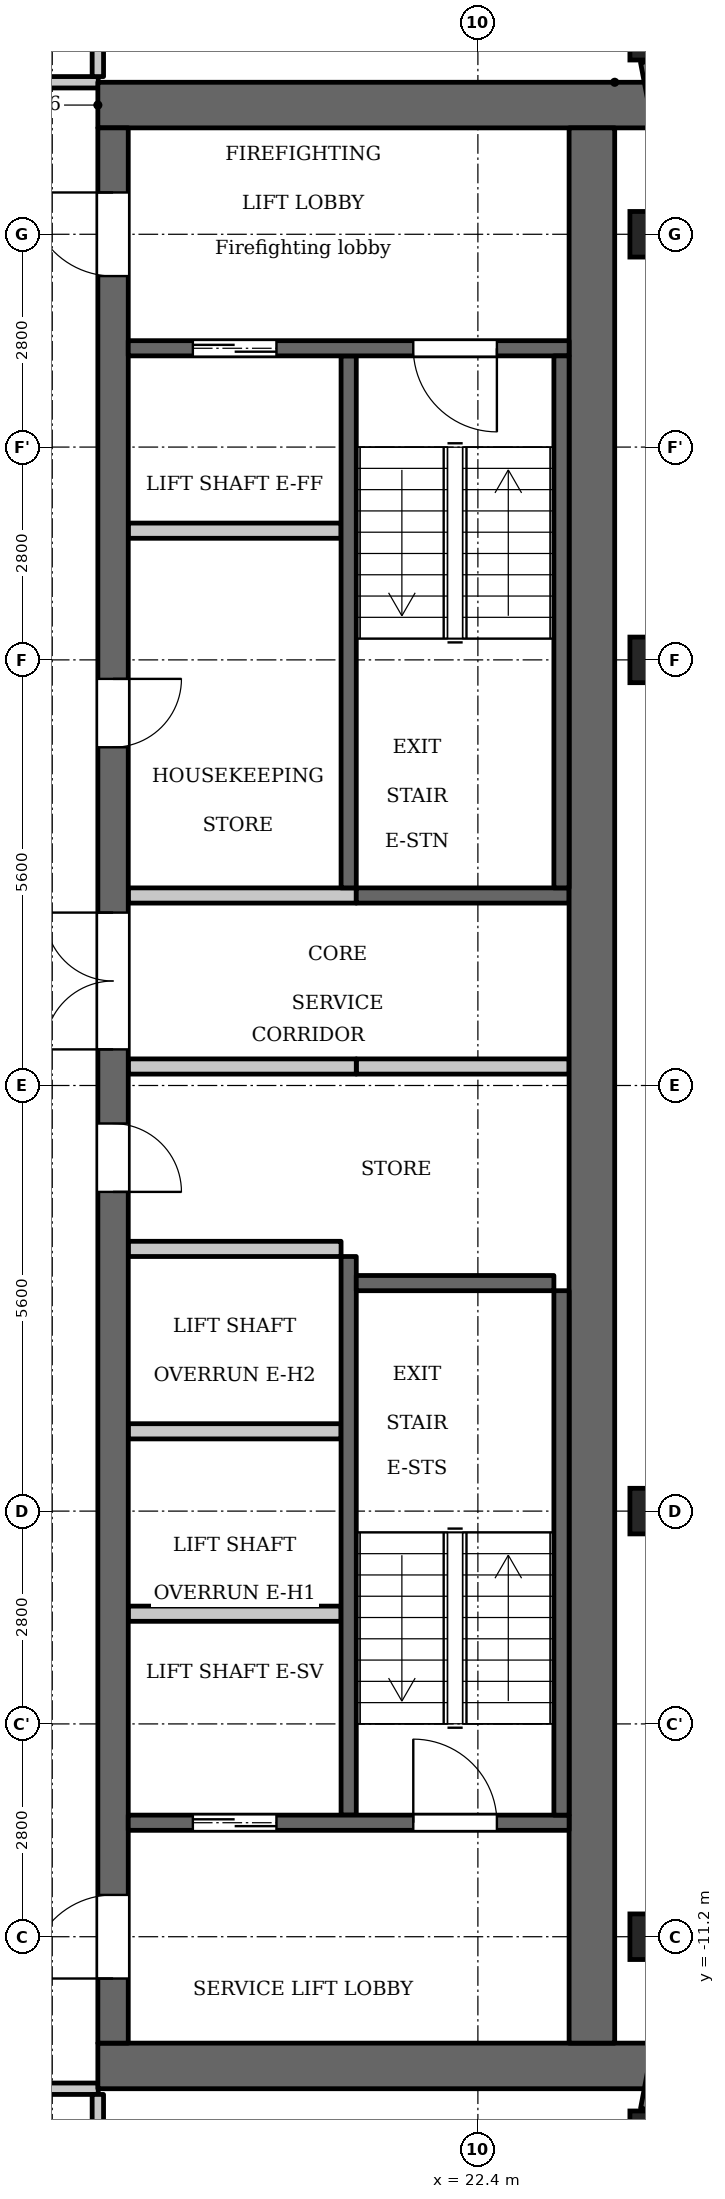
"""IFC4 building model, lengths in metres.
Left out: names, types, materials, properties, quantities, classifications, styles, units other than length and angle.
Written with IfcOpenShell. Run it as: python <this file> out.ifc"""

import sys

from ifc_helpers import new_model, si_unit, direction, frame, frame_2d, origin, origin_2d, place, context, subcontext, project, spatial, rectangle, extrude, element, fill, save


model = new_model("IFC4")
c1 = context("Model", 3, precision=1e-05, world=origin(), true_north=direction((0.0, 1.0)))
c2 = subcontext(c1, "Body", "Model", "MODEL_VIEW")
j1 = project(units=[si_unit("LENGTHUNIT", "METRE"), si_unit("PLANEANGLEUNIT", "RADIAN")], contexts=[c1])
p1 = place(None, origin())
s1 = spatial("IfcSite", under=j1, at=p1, CompositionType="ELEMENT")
p2 = place(p1, origin())
s2 = spatial("IfcBuilding", under=s1, at=p2, CompositionType="ELEMENT")
p3 = place(p2, frame((0.0, 0.0, 299.9)))
s3 = spatial("IfcBuildingStorey", under=s2, at=p3, CompositionType="ELEMENT", Elevation=299.9)
for number, where, z_axis, x_axis in (
    (1, (24.7, -13.793, 0.0), (0.0, 0.0, 1.0), (1.0, 0.0, 0.0)),
    (2, (24.7, -11.2, 0.0), (0.0, 0.0, 1.0), (1.0, 0.0, 0.0)),
    (3, (24.7, -5.6, 0.0), (0.0, 0.0, 1.0), (1.0, 0.0, 0.0)),
    (4, (24.7, 5.6, 0.0), (0.0, 0.0, 1.0), (1.0, 0.0, 0.0)),
    (5, (24.7, 11.2, 0.0), (0.0, 0.0, 1.0), (1.0, 0.0, 0.0)),
    (6, (24.7, 13.793, 0.0), (0.0, 0.0, 1.0), (1.0, 0.0, 0.0)),
):
    element("IfcColumn", number, at=place(p3, frame(where, z_axis=z_axis, x_axis=x_axis)), inside=s3, PredefinedType="COLUMN", context=c2, shape_type="SweptSolid", body=[
        extrude(rectangle(XDim=0.6, YDim=0.6, at=origin_2d()), origin(), (0.0, 0.0, 1.0), 3.5),
    ])
for number, where, z_axis, x_axis in (
    (7, (24.688, -13.485, 0.0), (0.0, 0.0, 1.0), (0.187, 0.982, 0.0)),
    (8, (25.052, 11.573, 0.0), (0.0, 0.0, 1.0), (-0.187, 0.982, 0.0)),
):
    element("IfcWall", number, at=place(p3, frame(where, z_axis=z_axis, x_axis=x_axis)), inside=s3, PredefinedType="SOLIDWALL", context=c2, shape_type="SweptSolid", body=[
        extrude(rectangle(XDim=1.947, YDim=0.3, at=frame_2d((0.973, 0.0))), origin(), (0.0, 0.0, 1.0), 2.6),
    ])
p4 = place(p3, frame((20.7, 2.6, 0.0), z_axis=(0.0, 0.0, 1.0), x_axis=(0.0, 1.0, 0.0)))
e9 = element("IfcWall", 9, at=p4, inside=s3, PredefinedType="SHEAR", context=c2, shape_type="SweptSolid", body=[
    extrude(rectangle(XDim=7.0, YDim=0.2, at=frame_2d((3.5, 0.0))), origin(), (0.0, 0.0, 1.0), 3.2),
])
p5 = place(p3, frame((20.7, -9.6, 0.0), z_axis=(0.0, 0.0, 1.0), x_axis=(0.0, 1.0, 0.0)))
e10 = element("IfcWall", 10, at=p5, inside=s3, PredefinedType="SHEAR", context=c2, shape_type="SweptSolid", body=[
    extrude(rectangle(XDim=7.35, YDim=0.2, at=frame_2d((3.675, 0.0))), origin(), (0.0, 0.0, 1.0), 3.2),
])
p6 = place(p3, frame((20.8, 2.5, 0.0), z_axis=(0.0, 0.0, 1.0), x_axis=(1.0, 0.0, 0.0)))
e11 = element("IfcWall", 11, at=p6, inside=s3, PredefinedType="SHEAR", context=c2, shape_type="SweptSolid", body=[
    extrude(rectangle(XDim=2.8, YDim=0.2, at=frame_2d((1.4, 0.0))), origin(), (0.0, 0.0, 1.0), 3.2),
])
p7 = place(p3, frame((20.8, 0.25, 0.0), z_axis=(0.0, 0.0, 1.0), x_axis=(1.0, 0.0, 0.0)))
e12 = element("IfcWall", 12, at=p7, inside=s3, PredefinedType="PARTITIONING", context=c2, shape_type="SweptSolid", body=[
    extrude(rectangle(XDim=2.8, YDim=0.2, at=frame_2d((1.4, 0.0))), origin(), (0.0, 0.0, 1.0), 3.2),
])
for number, where, z_axis, x_axis in (
    (13, (17.4, 12.9, 0.0), (0.0, 0.0, 1.0), (1.0, 0.0, 0.0)),
    (14, (17.4, -12.9, 0.0), (0.0, 0.0, 1.0), (1.0, 0.0, 0.0)),
):
    element("IfcWall", number, at=place(p3, frame(where, z_axis=z_axis, x_axis=x_axis)), inside=s3, PredefinedType="SHEAR", context=c2, shape_type="SweptSolid", body=[
        extrude(rectangle(XDim=7.6, YDim=0.6, at=frame_2d((3.8, 0.0))), origin(), (0.0, 0.0, 1.0), 3.2),
    ])
p8 = place(p3, frame((17.6, -12.6, 0.0), z_axis=(0.0, 0.0, 1.0), x_axis=(0.0, 1.0, 0.0)))
e15 = element("IfcWall", 15, at=p8, inside=s3, PredefinedType="SHEAR", context=c2, shape_type="SweptSolid", body=[
    extrude(rectangle(XDim=25.2, YDim=0.4, at=frame_2d((12.6, 0.0))), origin(), (0.0, 0.0, 1.0), 3.2),
])
p9 = place(p8, frame((11.2, 0.0, 0.0)))
e16 = element("IfcOpeningElement", 16, at=p9, cuts=e15, PredefinedType="OPENING", context=c2, shape_type="SweptSolid", body=[
    extrude(rectangle(XDim=0.9, YDim=2.1, at=frame_2d((0.45, 1.05))), frame((0.0, 0.21, 0.0), z_axis=(0.0, -1.0, 0.0), x_axis=(1.0, 0.0, 0.0)), (0.0, 0.0, 1.0), 0.42),
])
p10 = place(p8, frame((17.05, 0.0, 0.0)))
e17 = element("IfcOpeningElement", 17, at=p10, cuts=e15, PredefinedType="OPENING", context=c2, shape_type="SweptSolid", body=[
    extrude(rectangle(XDim=0.9, YDim=2.1, at=frame_2d((0.45, 1.05))), frame((0.0, 0.21, 0.0), z_axis=(0.0, -1.0, 0.0), x_axis=(1.0, 0.0, 0.0)), (0.0, 0.0, 1.0), 0.42),
])
p11 = place(p8, frame((23.25, 0.0, 0.0)))
e18 = element("IfcOpeningElement", 18, at=p11, cuts=e15, PredefinedType="OPENING", context=c2, shape_type="SweptSolid", body=[
    extrude(rectangle(XDim=1.1, YDim=2.1, at=frame_2d((0.55, 1.05))), frame((0.0, 0.21, 0.0), z_axis=(0.0, -1.0, 0.0), x_axis=(1.0, 0.0, 0.0)), (0.0, 0.0, 1.0), 0.42),
])
p12 = place(p8, frame((0.85, 0.0, 0.0)))
e19 = element("IfcOpeningElement", 19, at=p12, cuts=e15, PredefinedType="OPENING", context=c2, shape_type="SweptSolid", body=[
    extrude(rectangle(XDim=1.1, YDim=2.1, at=frame_2d((0.55, 1.05))), frame((0.0, 0.21, 0.0), z_axis=(0.0, -1.0, 0.0), x_axis=(1.0, 0.0, 0.0)), (0.0, 0.0, 1.0), 0.42),
])
p13 = place(p8, frame((13.075, 0.0, 0.0)))
e20 = element("IfcOpeningElement", 20, at=p13, cuts=e15, PredefinedType="OPENING", context=c2, shape_type="SweptSolid", body=[
    extrude(rectangle(XDim=1.8, YDim=2.1, at=frame_2d((0.9, 1.05))), frame((0.0, 0.21, 0.0), z_axis=(0.0, -1.0, 0.0), x_axis=(1.0, 0.0, 0.0)), (0.0, 0.0, 1.0), 0.42),
])
p14 = place(p3, frame((23.9, -12.6, 0.0), z_axis=(0.0, 0.0, 1.0), x_axis=(0.0, 1.0, 0.0)))
e21 = element("IfcWall", 21, at=p14, inside=s3, PredefinedType="SHEAR", context=c2, shape_type="SweptSolid", body=[
    extrude(rectangle(XDim=25.2, YDim=0.6, at=frame_2d((12.6, 0.0))), origin(), (0.0, 0.0, 1.0), 3.2),
])
p15 = place(p3, frame((17.8, -9.7, 0.0), z_axis=(0.0, 0.0, 1.0), x_axis=(1.0, 0.0, 0.0)))
e22 = element("IfcWall", 22, at=p15, inside=s3, PredefinedType="SHEAR", context=c2, shape_type="SweptSolid", body=[
    extrude(rectangle(XDim=5.8, YDim=0.2, at=frame_2d((2.9, 0.0))), origin(), (0.0, 0.0, 1.0), 3.2),
])
p16 = place(p15, frame((0.85, 0.0, 0.0)))
e23 = element("IfcOpeningElement", 23, at=p16, cuts=e22, PredefinedType="OPENING", context=c2, shape_type="SweptSolid", body=[
    extrude(rectangle(XDim=1.1, YDim=2.1, at=frame_2d((0.55, 1.05))), frame((0.0, 0.11, 0.0), z_axis=(0.0, -1.0, 0.0), x_axis=(1.0, 0.0, 0.0)), (0.0, 0.0, 1.0), 0.22),
])
p17 = place(p15, frame((3.75, 0.0, 0.0)))
e24 = element("IfcOpeningElement", 24, at=p17, cuts=e22, PredefinedType="OPENING", context=c2, shape_type="SweptSolid", body=[
    extrude(rectangle(XDim=1.1, YDim=2.1, at=frame_2d((0.55, 1.05))), frame((0.0, 0.11, 0.0), z_axis=(0.0, -1.0, 0.0), x_axis=(1.0, 0.0, 0.0)), (0.0, 0.0, 1.0), 0.22),
])
for number, where, z_axis, x_axis in (
    (25, (17.8, -6.95, 0.0), (0.0, 0.0, 1.0), (1.0, 0.0, 0.0)),
    (26, (17.8, -4.55, 0.0), (0.0, 0.0, 1.0), (1.0, 0.0, 0.0)),
    (27, (17.8, -2.15, 0.0), (0.0, 0.0, 1.0), (1.0, 0.0, 0.0)),
):
    element("IfcWall", number, at=place(p3, frame(where, z_axis=z_axis, x_axis=x_axis)), inside=s3, PredefinedType="PARTITIONING", context=c2, shape_type="SweptSolid", body=[
        extrude(rectangle(XDim=2.8, YDim=0.2, at=frame_2d((1.4, 0.0))), origin(), (0.0, 0.0, 1.0), 3.2),
    ])
for number, where, z_axis, x_axis in (
    (28, (17.8, 0.25, 0.0), (0.0, 0.0, 1.0), (1.0, 0.0, 0.0)),
    (29, (17.8, 2.5, 0.0), (0.0, 0.0, 1.0), (1.0, 0.0, 0.0)),
):
    element("IfcWall", number, at=place(p3, frame(where, z_axis=z_axis, x_axis=x_axis)), inside=s3, PredefinedType="PARTITIONING", context=c2, shape_type="SweptSolid", body=[
        extrude(rectangle(XDim=3.0, YDim=0.2, at=frame_2d((1.5, 0.0))), origin(), (0.0, 0.0, 1.0), 3.2),
    ])
p18 = place(p3, frame((17.8, 7.3, 0.0), z_axis=(0.0, 0.0, 1.0), x_axis=(1.0, 0.0, 0.0)))
e30 = element("IfcWall", 30, at=p18, inside=s3, PredefinedType="PARTITIONING", context=c2, shape_type="SweptSolid", body=[
    extrude(rectangle(XDim=2.8, YDim=0.2, at=frame_2d((1.4, 0.0))), origin(), (0.0, 0.0, 1.0), 3.2),
])
p19 = place(p3, frame((17.8, 9.7, 0.0), z_axis=(0.0, 0.0, 1.0), x_axis=(1.0, 0.0, 0.0)))
e31 = element("IfcWall", 31, at=p19, inside=s3, PredefinedType="SHEAR", context=c2, shape_type="SweptSolid", body=[
    extrude(rectangle(XDim=5.8, YDim=0.2, at=frame_2d((2.9, 0.0))), origin(), (0.0, 0.0, 1.0), 3.2),
])
p20 = place(p19, frame((0.85, 0.0, 0.0)))
e32 = element("IfcOpeningElement", 32, at=p20, cuts=e31, PredefinedType="OPENING", context=c2, shape_type="SweptSolid", body=[
    extrude(rectangle(XDim=1.1, YDim=2.1, at=frame_2d((0.55, 1.05))), frame((0.0, 0.11, 0.0), z_axis=(0.0, -1.0, 0.0), x_axis=(1.0, 0.0, 0.0)), (0.0, 0.0, 1.0), 0.22),
])
p21 = place(p19, frame((3.75, 0.0, 0.0)))
e33 = element("IfcOpeningElement", 33, at=p21, cuts=e31, PredefinedType="OPENING", context=c2, shape_type="SweptSolid", body=[
    extrude(rectangle(XDim=1.1, YDim=2.1, at=frame_2d((0.55, 1.05))), frame((0.0, 0.11, 0.0), z_axis=(0.0, -1.0, 0.0), x_axis=(1.0, 0.0, 0.0)), (0.0, 0.0, 1.0), 0.22),
])
p22 = place(p3, frame((23.5, 2.6, 0.0), z_axis=(0.0, 0.0, 1.0), x_axis=(0.0, 1.0, 0.0)))
e34 = element("IfcWall", 34, at=p22, inside=s3, PredefinedType="SHEAR", context=c2, shape_type="SweptSolid", body=[
    extrude(rectangle(XDim=7.0, YDim=0.2, at=frame_2d((3.5, 0.0))), origin(), (0.0, 0.0, 1.0), 3.2),
])
p23 = place(p3, frame((23.5, -9.6, 0.0), z_axis=(0.0, 0.0, 1.0), x_axis=(0.0, 1.0, 0.0)))
e35 = element("IfcWall", 35, at=p23, inside=s3, PredefinedType="SHEAR", context=c2, shape_type="SweptSolid", body=[
    extrude(rectangle(XDim=6.9, YDim=0.2, at=frame_2d((3.45, 0.0))), origin(), (0.0, 0.0, 1.0), 3.2),
])
p24 = place(p3, frame((20.8, -2.6, 0.0), z_axis=(0.0, 0.0, 1.0), x_axis=(1.0, 0.0, 0.0)))
e36 = element("IfcWall", 36, at=p24, inside=s3, PredefinedType="SHEAR", context=c2, shape_type="SweptSolid", body=[
    extrude(rectangle(XDim=2.6, YDim=0.2, at=frame_2d((1.3, 0.0))), origin(), (0.0, 0.0, 1.0), 3.2),
])
p25 = place(p3, frame((15.32, -13.2, 0.0), z_axis=(0.0, 0.0, 1.0), x_axis=(1.0, 0.0, 0.0)))
e37 = element("IfcWall", 37, at=p25, inside=s3, PredefinedType="PARTITIONING", context=c2, shape_type="SweptSolid", body=[
    extrude(rectangle(XDim=2.085, YDim=0.15, at=frame_2d((1.042, 0.0))), origin(), (0.0, 0.0, 1.0), 3.2),
])
p26 = place(p25, frame((0.42, 0.0, 0.0)))
e38 = element("IfcOpeningElement", 38, at=p26, cuts=e37, PredefinedType="OPENING", context=c2, shape_type="SweptSolid", body=[
    extrude(rectangle(XDim=1.0, YDim=2.1, at=frame_2d((0.5, 1.05))), frame((0.0, 0.085, 0.0), z_axis=(0.0, -1.0, 0.0), x_axis=(1.0, 0.0, 0.0)), (0.0, 0.0, 1.0), 0.17),
])
p27 = place(p3, frame((15.32, 13.2, 0.0), z_axis=(0.0, 0.0, 1.0), x_axis=(1.0, 0.0, 0.0)))
e39 = element("IfcWall", 39, at=p27, inside=s3, PredefinedType="PARTITIONING", context=c2, shape_type="SweptSolid", body=[
    extrude(rectangle(XDim=2.085, YDim=0.15, at=frame_2d((1.042, 0.0))), origin(), (0.0, 0.0, 1.0), 3.2),
])
p28 = place(p27, frame((0.43, 0.0, 0.0)))
e40 = element("IfcOpeningElement", 40, at=p28, cuts=e39, PredefinedType="OPENING", context=c2, shape_type="SweptSolid", body=[
    extrude(rectangle(XDim=1.0, YDim=2.1, at=frame_2d((0.5, 1.05))), frame((0.0, 0.085, 0.0), z_axis=(0.0, -1.0, 0.0), x_axis=(1.0, 0.0, 0.0)), (0.0, 0.0, 1.0), 0.17),
])
p29 = place(p3, frame((17.4, -19.236, 0.0), z_axis=(0.0, 0.0, 1.0), x_axis=(0.0, 1.0, 0.0)))
e41 = element("IfcWall", 41, at=p29, inside=s3, PredefinedType="PARTITIONING", context=c2, shape_type="SweptSolid", body=[
    extrude(rectangle(XDim=5.961, YDim=0.15, at=frame_2d((2.981, 0.0))), origin(), (0.0, 0.0, 1.0), 3.2),
])
p30 = place(p29, frame((3.917, 0.0, 0.0)))
e42 = element("IfcOpeningElement", 42, at=p30, cuts=e41, PredefinedType="OPENING", context=c2, shape_type="SweptSolid", body=[
    extrude(rectangle(XDim=0.9, YDim=2.1, at=frame_2d((0.45, 1.05))), frame((0.0, 0.085, 0.0), z_axis=(0.0, -1.0, 0.0), x_axis=(1.0, 0.0, 0.0)), (0.0, 0.0, 1.0), 0.17),
])
p31 = place(p3, frame((17.4, 13.275, 0.0), z_axis=(0.0, 0.0, 1.0), x_axis=(0.0, 1.0, 0.0)))
e43 = element("IfcWall", 43, at=p31, inside=s3, PredefinedType="PARTITIONING", context=c2, shape_type="SweptSolid", body=[
    extrude(rectangle(XDim=5.961, YDim=0.15, at=frame_2d((2.981, 0.0))), origin(), (0.0, 0.0, 1.0), 3.2),
])
p32 = place(p31, frame((4.575, 0.0, 0.0)))
e44 = element("IfcOpeningElement", 44, at=p32, cuts=e43, PredefinedType="OPENING", context=c2, shape_type="SweptSolid", body=[
    extrude(rectangle(XDim=1.0, YDim=2.1, at=frame_2d((0.5, 1.05))), frame((0.0, 0.085, 0.0), z_axis=(0.0, -1.0, 0.0), x_axis=(1.0, 0.0, 0.0)), (0.0, 0.0, 1.0), 0.17),
])
p33 = place(p16, origin())
e45 = element("IfcDoor", 45, at=p33, inside=s3, OperationType="DOUBLE_DOOR_SLIDING", PredefinedType="DOOR", context=c2, shape_type="SweptSolid", body=[
    extrude(rectangle(XDim=1.1, YDim=2.1, at=frame_2d((0.55, 1.05))), frame((0.0, 0.025, 0.0), z_axis=(0.0, -1.0, 0.0), x_axis=(1.0, 0.0, 0.0)), (0.0, 0.0, 1.0), 0.05),
])
fill(e23, e45)
p34 = place(p9, origin())
e46 = element("IfcDoor", 46, at=p34, inside=s3, OperationType="SINGLE_SWING_LEFT", PredefinedType="DOOR", context=c2, shape_type="SweptSolid", body=[
    extrude(rectangle(XDim=0.9, YDim=2.1, at=frame_2d((0.45, 1.05))), frame((0.0, 0.025, 0.0), z_axis=(0.0, -1.0, 0.0), x_axis=(1.0, 0.0, 0.0)), (0.0, 0.0, 1.0), 0.05),
])
fill(e16, e46)
p35 = place(p10, origin())
e47 = element("IfcDoor", 47, at=p35, inside=s3, OperationType="SINGLE_SWING_RIGHT", PredefinedType="DOOR", context=c2, shape_type="SweptSolid", body=[
    extrude(rectangle(XDim=0.9, YDim=2.1, at=frame_2d((0.45, 1.05))), frame((0.0, 0.025, 0.0), z_axis=(0.0, -1.0, 0.0), x_axis=(1.0, 0.0, 0.0)), (0.0, 0.0, 1.0), 0.05),
])
fill(e17, e47)
p36 = place(p20, origin())
e48 = element("IfcDoor", 48, at=p36, inside=s3, OperationType="DOUBLE_DOOR_SLIDING", PredefinedType="DOOR", context=c2, shape_type="SweptSolid", body=[
    extrude(rectangle(XDim=1.1, YDim=2.1, at=frame_2d((0.55, 1.05))), frame((0.0, 0.025, 0.0), z_axis=(0.0, -1.0, 0.0), x_axis=(1.0, 0.0, 0.0)), (0.0, 0.0, 1.0), 0.05),
])
fill(e32, e48)
p37 = place(p11, origin())
e49 = element("IfcDoor", 49, at=p37, inside=s3, OperationType="SINGLE_SWING_LEFT", PredefinedType="DOOR", context=c2, shape_type="SweptSolid", body=[
    extrude(rectangle(XDim=1.1, YDim=2.1, at=frame_2d((0.55, 1.05))), frame((0.0, 0.025, 0.0), z_axis=(0.0, -1.0, 0.0), x_axis=(1.0, 0.0, 0.0)), (0.0, 0.0, 1.0), 0.05),
])
fill(e18, e49)
p38 = place(p12, origin())
e50 = element("IfcDoor", 50, at=p38, inside=s3, OperationType="SINGLE_SWING_RIGHT", PredefinedType="DOOR", context=c2, shape_type="SweptSolid", body=[
    extrude(rectangle(XDim=1.1, YDim=2.1, at=frame_2d((0.55, 1.05))), frame((0.0, 0.025, 0.0), z_axis=(0.0, -1.0, 0.0), x_axis=(1.0, 0.0, 0.0)), (0.0, 0.0, 1.0), 0.05),
])
fill(e19, e50)
p39 = place(p21, origin())
e51 = element("IfcDoor", 51, at=p39, inside=s3, OperationType="SINGLE_SWING_RIGHT", PredefinedType="DOOR", context=c2, shape_type="SweptSolid", body=[
    extrude(rectangle(XDim=1.1, YDim=2.1, at=frame_2d((0.55, 1.05))), frame((0.0, 0.025, 0.0), z_axis=(0.0, -1.0, 0.0), x_axis=(1.0, 0.0, 0.0)), (0.0, 0.0, 1.0), 0.05),
])
fill(e33, e51)
p40 = place(p17, origin())
e52 = element("IfcDoor", 52, at=p40, inside=s3, OperationType="SINGLE_SWING_RIGHT", PredefinedType="DOOR", context=c2, shape_type="SweptSolid", body=[
    extrude(rectangle(XDim=1.1, YDim=2.1, at=frame_2d((0.55, 1.05))), frame((0.0, 0.025, 0.0), z_axis=(0.0, -1.0, 0.0), x_axis=(1.0, 0.0, 0.0)), (0.0, 0.0, 1.0), 0.05),
])
fill(e24, e52)
p41 = place(p13, origin())
e53 = element("IfcDoor", 53, at=p41, inside=s3, OperationType="DOUBLE_DOOR_SINGLE_SWING", PredefinedType="DOOR", context=c2, shape_type="SweptSolid", body=[
    extrude(rectangle(XDim=1.8, YDim=2.1, at=frame_2d((0.9, 1.05))), frame((0.0, 0.025, 0.0), z_axis=(0.0, -1.0, 0.0), x_axis=(1.0, 0.0, 0.0)), (0.0, 0.0, 1.0), 0.05),
])
fill(e20, e53)
save(model, sys.argv[1])
